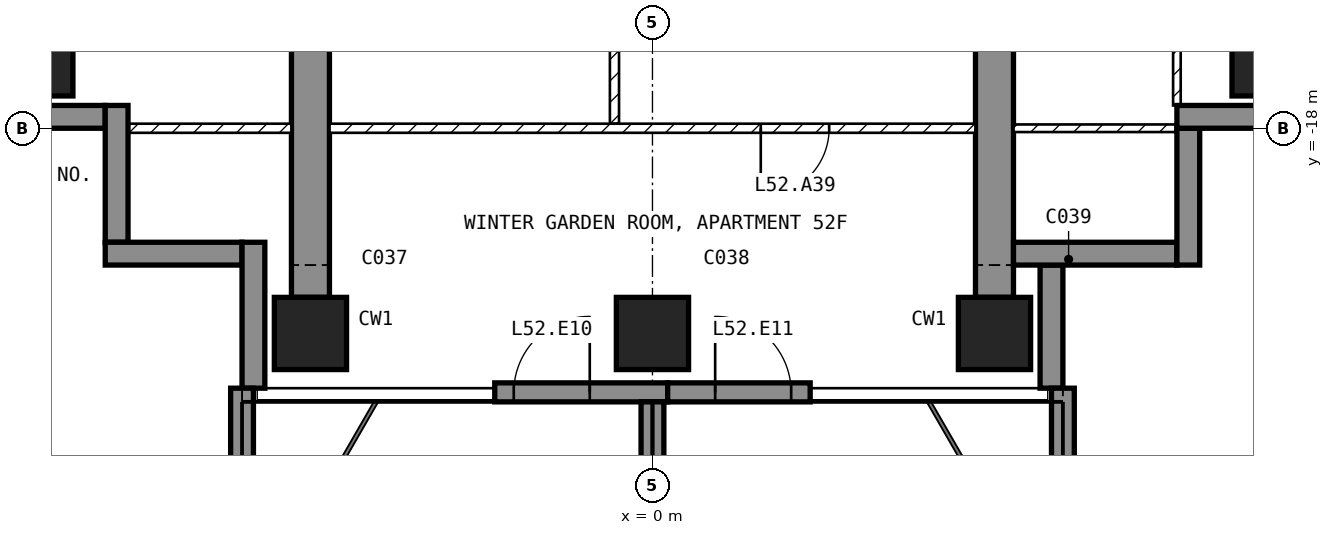
"""IFC4 building model, lengths in metres.
Left out: names, types, materials, properties, quantities, classifications, styles, units other than length and angle.
Written with IfcOpenShell. Run it as: python <this file> out.ifc"""

import sys

from ifc_helpers import new_model, si_unit, direction, frame, frame_2d, origin, origin_2d, place, context, subcontext, project, spatial, polyline, rectangle, outline, extrude, element, fill, save


model = new_model("IFC4")
c1 = context("Model", 3, precision=1e-05, world=origin(), true_north=direction((0.0, 1.0)))
c2 = subcontext(c1, "Body", "Model", "MODEL_VIEW")
j1 = project(units=[si_unit("LENGTHUNIT", "METRE"), si_unit("PLANEANGLEUNIT", "RADIAN")], contexts=[c1])
p1 = place(None, origin())
s1 = spatial("IfcSite", under=j1, at=p1, CompositionType="ELEMENT")
p2 = place(p1, origin())
s2 = spatial("IfcBuilding", under=s1, at=p2, CompositionType="ELEMENT")
p3 = place(p2, frame((0.0, 0.0, 208.6)))
s3 = spatial("IfcBuildingStorey", under=s2, at=p3, CompositionType="ELEMENT", Elevation=208.6)
for number, where, z_axis, x_axis in (
    (1, (-8.1, -17.1, -0.25), (0.0, 0.0, 1.0), (1.0, 0.0, 0.0)),
    (2, (-4.5, -20.7, -0.25), (0.0, 0.0, 1.0), (1.0, 0.0, 0.0)),
    (3, (0.0, -20.7, -0.25), (0.0, 0.0, 1.0), (1.0, 0.0, 0.0)),
    (4, (4.5, -20.7, -0.25), (0.0, 0.0, 1.0), (1.0, 0.0, 0.0)),
    (5, (8.1, -17.1, -0.25), (0.0, 0.0, 1.0), (1.0, 0.0, 0.0)),
):
    element("IfcColumn", number, at=place(p3, frame(where, z_axis=z_axis, x_axis=x_axis)), inside=s3, PredefinedType="COLUMN", context=c2, shape_type="SweptSolid", body=[
        extrude(rectangle(XDim=0.95, YDim=0.95, at=origin_2d()), origin(), (0.0, 0.0, 1.0), 3.5),
    ])
for number, where, z_axis, x_axis in (
    (6, (-4.75, -20.225, -0.25), (1.0, 0.0, 0.0), (0.0, 1.0, 0.0)),
    (7, (4.25, -20.225, -0.25), (1.0, 0.0, 0.0), (0.0, 1.0, 0.0)),
):
    element("IfcWall", number, at=place(p3, frame(where, z_axis=z_axis, x_axis=x_axis)), inside=s3, PredefinedType="SHEAR", context=c2, shape_type="SweptSolid", body=[
        extrude(outline(polyline([(0.0, 0.0), (6.725, 0.0), (6.725, 2.65), (9.125, 2.65), (9.125, 0.0), (11.225, 0.0), (11.225, 3.5), (0.0, 3.5), (0.0, 0.0)])), origin(), (0.0, 0.0, 1.0), 0.5),
    ])
p4 = place(p3, frame((-2.075, -21.475, 0.0), z_axis=(0.0, 0.0, 1.0), x_axis=(1.0, 0.0, 0.0)))
e8 = element("IfcWall", 8, at=p4, inside=s3, PredefinedType="SOLIDWALL", context=c2, shape_type="SweptSolid", body=[
    extrude(rectangle(XDim=2.275, YDim=0.25, at=frame_2d((1.137, 0.0))), origin(), (0.0, 0.0, 1.0), 3.25),
])
p5 = place(p4, frame((0.25, 0.0, 0.0)))
e9 = element("IfcOpeningElement", 9, at=p5, cuts=e8, PredefinedType="OPENING", context=c2, shape_type="SweptSolid", body=[
    extrude(rectangle(XDim=1.0, YDim=2.4, at=frame_2d((0.5, 1.2))), frame((0.0, 0.135, 0.0), z_axis=(0.0, -1.0, 0.0), x_axis=(1.0, 0.0, 0.0)), (0.0, 0.0, 1.0), 0.27),
])
p6 = place(p3, frame((0.2, -21.475, 0.0), z_axis=(0.0, 0.0, 1.0), x_axis=(1.0, 0.0, 0.0)))
e10 = element("IfcWall", 10, at=p6, inside=s3, PredefinedType="SOLIDWALL", context=c2, shape_type="SweptSolid", body=[
    extrude(rectangle(XDim=1.875, YDim=0.25, at=frame_2d((0.938, 0.0))), origin(), (0.0, 0.0, 1.0), 3.25),
])
p7 = place(p6, frame((0.625, 0.0, 0.0)))
e11 = element("IfcOpeningElement", 11, at=p7, cuts=e10, PredefinedType="OPENING", context=c2, shape_type="SweptSolid", body=[
    extrude(rectangle(XDim=1.0, YDim=2.4, at=frame_2d((0.5, 1.2))), frame((0.0, 0.135, 0.0), z_axis=(0.0, -1.0, 0.0), x_axis=(1.0, 0.0, 0.0)), (0.0, 0.0, 1.0), 0.27),
])
p8 = place(p3, frame((5.25, -21.42, 0.0), z_axis=(0.0, 0.0, 1.0), x_axis=(0.0, 1.0, 0.0)))
e12 = element("IfcWall", 12, at=p8, inside=s3, PredefinedType="SOLIDWALL", context=c2, shape_type="SweptSolid", body=[
    extrude(rectangle(XDim=1.62, YDim=0.3, at=frame_2d((0.81, 0.0))), origin(), (0.0, 0.0, 1.0), 3.25),
])
p9 = place(p3, frame((4.75, -19.65, 0.0), z_axis=(0.0, 0.0, 1.0), x_axis=(1.0, 0.0, 0.0)))
e13 = element("IfcWall", 13, at=p9, inside=s3, PredefinedType="SOLIDWALL", context=c2, shape_type="SweptSolid", body=[
    extrude(rectangle(XDim=2.15, YDim=0.3, at=frame_2d((1.075, 0.0))), origin(), (0.0, 0.0, 1.0), 3.25),
])
p10 = place(p3, frame((7.05, -19.8, 0.0), z_axis=(0.0, 0.0, 1.0), x_axis=(0.0, 1.0, 0.0)))
e14 = element("IfcWall", 14, at=p10, inside=s3, PredefinedType="SOLIDWALL", context=c2, shape_type="SweptSolid", body=[
    extrude(rectangle(XDim=1.8, YDim=0.3, at=frame_2d((0.9, 0.0))), origin(), (0.0, 0.0, 1.0), 3.25),
])
p11 = place(p3, frame((6.9, -17.85, 0.0), z_axis=(0.0, 0.0, 1.0), x_axis=(1.0, 0.0, 0.0)))
e15 = element("IfcWall", 15, at=p11, inside=s3, PredefinedType="SOLIDWALL", context=c2, shape_type="SweptSolid", body=[
    extrude(rectangle(XDim=1.85, YDim=0.3, at=frame_2d((0.925, 0.0))), origin(), (0.0, 0.0, 1.0), 3.25),
])
p12 = place(p3, frame((-8.75, -17.85, 0.0), z_axis=(0.0, 0.0, 1.0), x_axis=(1.0, 0.0, 0.0)))
e16 = element("IfcWall", 16, at=p12, inside=s3, PredefinedType="SOLIDWALL", context=c2, shape_type="SweptSolid", body=[
    extrude(rectangle(XDim=1.55, YDim=0.3, at=frame_2d((0.775, 0.0))), origin(), (0.0, 0.0, 1.0), 3.25),
])
for number, where, z_axis, x_axis in (
    (17, (-7.05, -17.7, 0.0), (0.0, 0.0, 1.0), (0.0, -1.0, 0.0)),
    (18, (-7.2, -19.65, 0.0), (0.0, 0.0, 1.0), (1.0, 0.0, 0.0)),
):
    element("IfcWall", number, at=place(p3, frame(where, z_axis=z_axis, x_axis=x_axis)), inside=s3, PredefinedType="SOLIDWALL", context=c2, shape_type="SweptSolid", body=[
        extrude(rectangle(XDim=1.8, YDim=0.3, at=frame_2d((0.9, 0.0))), origin(), (0.0, 0.0, 1.0), 3.25),
    ])
p13 = place(p3, frame((-5.25, -19.5, 0.0), z_axis=(0.0, 0.0, 1.0), x_axis=(0.0, -1.0, 0.0)))
e19 = element("IfcWall", 19, at=p13, inside=s3, PredefinedType="SOLIDWALL", context=c2, shape_type="SweptSolid", body=[
    extrude(rectangle(XDim=1.92, YDim=0.3, at=frame_2d((0.96, 0.0))), origin(), (0.0, 0.0, 1.0), 3.25),
])
p14 = place(p3, frame((-5.4, -21.42, 0.0), z_axis=(0.0, 0.0, 1.0), x_axis=(0.0, -1.0, 0.0)))
e20 = element("IfcWall", 20, at=p14, inside=s3, PredefinedType="SOLIDWALL", context=c2, shape_type="SweptSolid", body=[
    extrude(rectangle(XDim=2.88, YDim=0.3, at=frame_2d((1.44, 0.0))), origin(), (0.0, 0.0, 1.0), 3.25),
])
p15 = place(p3, frame((0.0, -21.6, 0.0), z_axis=(0.0, 0.0, 1.0), x_axis=(0.0, -1.0, 0.0)))
e21 = element("IfcWall", 21, at=p15, inside=s3, PredefinedType="SOLIDWALL", context=c2, shape_type="SweptSolid", body=[
    extrude(rectangle(XDim=2.7, YDim=0.3, at=frame_2d((1.35, 0.0))), origin(), (0.0, 0.0, 1.0), 3.25),
])
p16 = place(p3, frame((5.4, -21.42, 0.0), z_axis=(0.0, 0.0, 1.0), x_axis=(0.0, -1.0, 0.0)))
e22 = element("IfcWall", 22, at=p16, inside=s3, PredefinedType="SOLIDWALL", context=c2, shape_type="SweptSolid", body=[
    extrude(rectangle(XDim=2.88, YDim=0.3, at=frame_2d((1.44, 0.0))), origin(), (0.0, 0.0, 1.0), 3.25),
])
p17 = place(p3, frame((-0.5, -17.94, 0.0), z_axis=(0.0, 0.0, 1.0), x_axis=(0.0, 1.0, 0.0)))
e23 = element("IfcWall", 23, at=p17, inside=s3, PredefinedType="PARTITIONING", context=c2, shape_type="SweptSolid", body=[
    extrude(rectangle(XDim=2.88, YDim=0.12, at=frame_2d((1.44, 0.0))), origin(), (0.0, 0.0, 1.0), 3.25),
])
p18 = place(p17, frame((0.99, 0.0, 0.0)))
e24 = element("IfcOpeningElement", 24, at=p18, cuts=e23, PredefinedType="OPENING", context=c2, shape_type="SweptSolid", body=[
    extrude(rectangle(XDim=0.9, YDim=2.1, at=frame_2d((0.45, 1.05))), frame((0.0, 0.07, 0.0), z_axis=(0.0, -1.0, 0.0), x_axis=(1.0, 0.0, 0.0)), (0.0, 0.0, 1.0), 0.14),
])
p19 = place(p3, frame((4.25, -18.0, 0.0), z_axis=(0.0, 0.0, 1.0), x_axis=(-1.0, 0.0, 0.0)))
e25 = element("IfcWall", 25, at=p19, inside=s3, PredefinedType="PARTITIONING", context=c2, shape_type="SweptSolid", body=[
    extrude(rectangle(XDim=8.5, YDim=0.12, at=frame_2d((4.25, 0.0))), origin(), (0.0, 0.0, 1.0), 3.25),
])
p20 = place(p19, frame((1.925, 0.0, 0.0)))
e26 = element("IfcOpeningElement", 26, at=p20, cuts=e25, PredefinedType="OPENING", context=c2, shape_type="SweptSolid", body=[
    extrude(rectangle(XDim=0.9, YDim=2.1, at=frame_2d((0.45, 1.05))), frame((0.0, 0.07, 0.0), z_axis=(0.0, -1.0, 0.0), x_axis=(1.0, 0.0, 0.0)), (0.0, 0.0, 1.0), 0.14),
])
p21 = place(p3, frame((6.9, -17.7, 0.0), z_axis=(0.0, 0.0, 1.0), x_axis=(0.0, 1.0, 0.0)))
e27 = element("IfcWall", 27, at=p21, inside=s3, PredefinedType="PARTITIONING", context=c2, shape_type="SweptSolid", body=[
    extrude(rectangle(XDim=3.25, YDim=0.1, at=frame_2d((1.625, 0.0))), origin(), (0.0, 0.0, 1.0), 3.25),
])
p22 = place(p21, frame((2.05, 0.0, 0.0)))
e28 = element("IfcOpeningElement", 28, at=p22, cuts=e27, PredefinedType="OPENING", context=c2, shape_type="SweptSolid", body=[
    extrude(rectangle(XDim=0.85, YDim=2.1, at=frame_2d((0.425, 1.05))), frame((0.0, 0.06, 0.0), z_axis=(0.0, -1.0, 0.0), x_axis=(1.0, 0.0, 0.0)), (0.0, 0.0, 1.0), 0.12),
])
p23 = place(p3, frame((7.12, -18.0, 0.0), z_axis=(0.0, 0.0, 1.0), x_axis=(-1.0, 0.0, 0.0)))
e29 = element("IfcWall", 29, at=p23, inside=s3, PredefinedType="PARTITIONING", context=c2, shape_type="SweptSolid", body=[
    extrude(rectangle(XDim=2.37, YDim=0.1, at=frame_2d((1.185, 0.0))), origin(), (0.0, 0.0, 1.0), 3.25),
])
p24 = place(p3, frame((-4.75, -18.0, 0.0), z_axis=(0.0, 0.0, 1.0), x_axis=(-1.0, 0.0, 0.0)))
e30 = element("IfcWall", 30, at=p24, inside=s3, PredefinedType="PARTITIONING", context=c2, shape_type="SweptSolid", body=[
    extrude(rectangle(XDim=2.37, YDim=0.12, at=frame_2d((1.185, 0.0))), origin(), (0.0, 0.0, 1.0), 3.25),
])
p25 = place(p5, origin())
e31 = element("IfcDoor", 31, at=p25, inside=s3, OperationType="SINGLE_SWING_RIGHT", PredefinedType="DOOR", context=c2, shape_type="SweptSolid", body=[
    extrude(rectangle(XDim=1.0, YDim=2.4, at=frame_2d((0.5, 1.2))), frame((0.0, 0.025, 0.0), z_axis=(0.0, -1.0, 0.0), x_axis=(1.0, 0.0, 0.0)), (0.0, 0.0, 1.0), 0.05),
])
fill(e9, e31)
p26 = place(p7, origin())
e32 = element("IfcDoor", 32, at=p26, inside=s3, OperationType="SINGLE_SWING_LEFT", PredefinedType="DOOR", context=c2, shape_type="SweptSolid", body=[
    extrude(rectangle(XDim=1.0, YDim=2.4, at=frame_2d((0.5, 1.2))), frame((0.0, 0.025, 0.0), z_axis=(0.0, -1.0, 0.0), x_axis=(1.0, 0.0, 0.0)), (0.0, 0.0, 1.0), 0.05),
])
fill(e11, e32)
p27 = place(p20, origin())
e33 = element("IfcDoor", 33, at=p27, inside=s3, OperationType="SINGLE_SWING_RIGHT", PredefinedType="DOOR", context=c2, shape_type="SweptSolid", body=[
    extrude(rectangle(XDim=0.9, YDim=2.1, at=frame_2d((0.45, 1.05))), frame((0.0, 0.025, 0.0), z_axis=(0.0, -1.0, 0.0), x_axis=(1.0, 0.0, 0.0)), (0.0, 0.0, 1.0), 0.05),
])
fill(e26, e33)
save(model, sys.argv[1])
